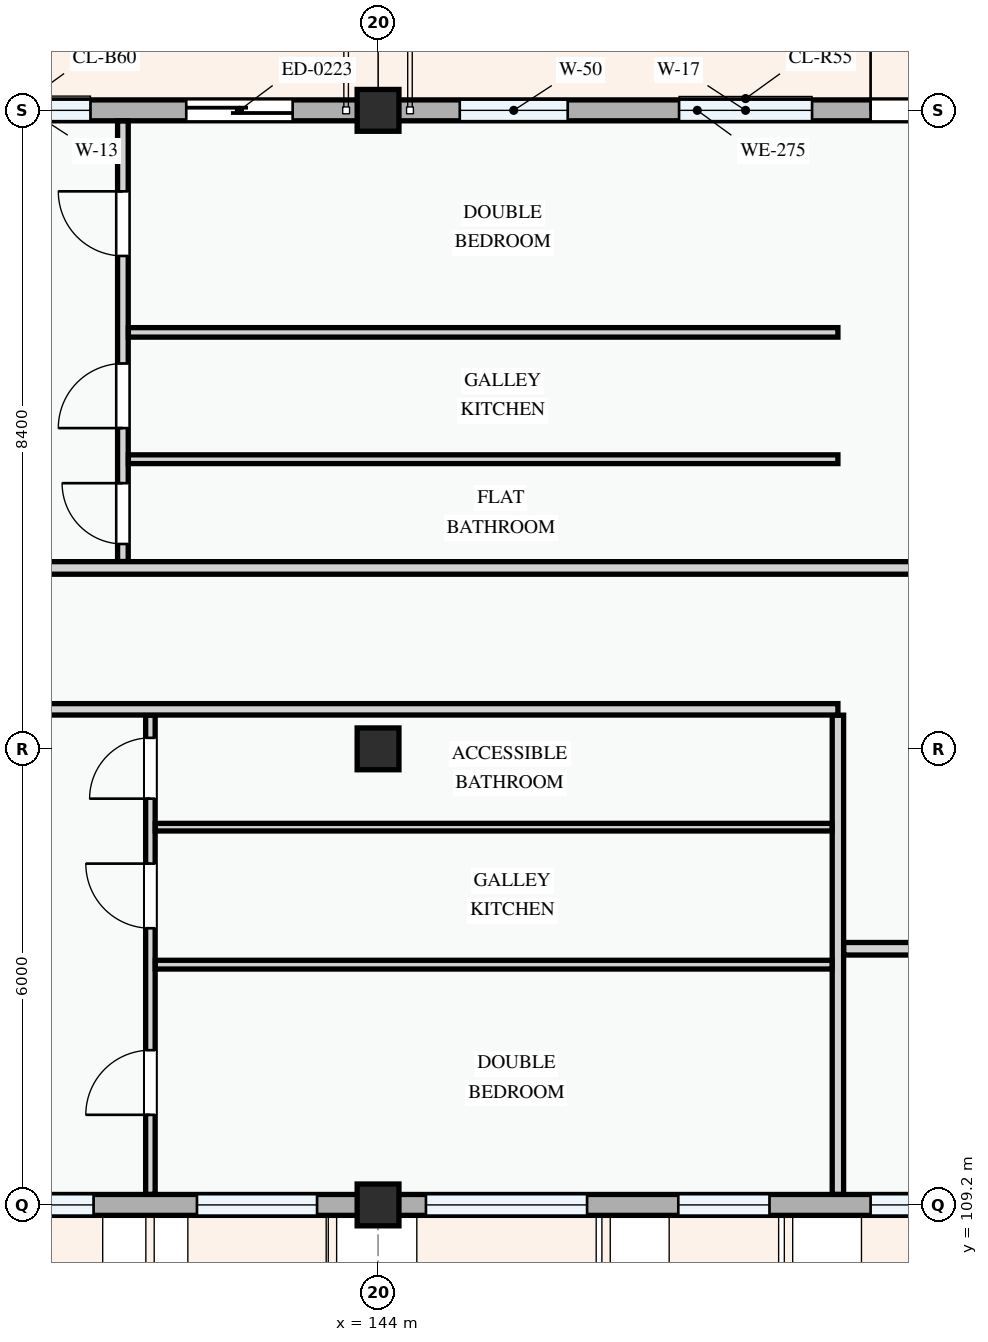
"""IFC4 building model, lengths in metres.
Left out: names, types, materials, properties, quantities, classifications, styles, units other than length and angle.
Written with IfcOpenShell. Run it as: python <this file> out.ifc"""

import sys

from ifc_helpers import new_model, si_unit, direction, frame, frame_2d, origin, origin_2d, place, context, subcontext, project, spatial, rectangle, extrude, element, fill, save


model = new_model("IFC4")
c1 = context("Model", 3, precision=1e-05, world=origin(), true_north=direction((0.0, 1.0)))
c2 = subcontext(c1, "Body", "Model", "MODEL_VIEW")
j1 = project(units=[si_unit("LENGTHUNIT", "METRE"), si_unit("PLANEANGLEUNIT", "RADIAN")], contexts=[c1])
p1 = place(None, origin())
s1 = spatial("IfcSite", under=j1, at=p1, CompositionType="ELEMENT")
p2 = place(p1, origin())
s2 = spatial("IfcBuilding", under=s1, at=p2, CompositionType="ELEMENT")
p3 = place(p2, frame((0.0, 0.0, 27.9)))
s3 = spatial("IfcBuildingStorey", under=s2, at=p3, CompositionType="ELEMENT", Elevation=27.9)
for number, where, z_axis, x_axis in (
    (1, (144.0, 109.2, 0.0), (0.0, 0.0, 1.0), (1.0, 0.0, 0.0)),
    (2, (144.0, 115.2, 0.0), (0.0, 0.0, 1.0), (1.0, 0.0, 0.0)),
    (3, (144.0, 123.6, 0.0), (0.0, 0.0, 1.0), (1.0, 0.0, 0.0)),
):
    element("IfcColumn", number, at=place(p3, frame(where, z_axis=z_axis, x_axis=x_axis)), inside=s3, PredefinedType="COLUMN", context=c2, shape_type="SweptSolid", body=[
        extrude(rectangle(XDim=0.55, YDim=0.55, at=origin_2d()), origin(), (0.0, 0.0, 1.0), 3.3),
    ])
p4 = place(p3, frame((152.4, 123.6, 0.0), z_axis=(0.0, 0.0, 1.0), x_axis=(-1.0, 0.0, 0.0)))
e4 = element("IfcWall", 4, at=p4, inside=s3, PredefinedType="STANDARD", context=c2, shape_type="SweptSolid", body=[
    extrude(rectangle(XDim=8.4, YDim=0.275, at=frame_2d((4.2, 0.0))), origin(), (0.0, 0.0, 1.0), 2.345),
])
p5 = place(p4, frame((0.62, 0.0, 0.0)))
e5 = element("IfcOpeningElement", 5, at=p5, cuts=e4, PredefinedType="OPENING", context=c2, shape_type="SweptSolid", body=[
    extrude(rectangle(XDim=1.3, YDim=2.15, at=frame_2d((0.65, 1.075))), frame((0.0, 0.147, 0.0), z_axis=(0.0, -1.0, 0.0), x_axis=(1.0, 0.0, 0.0)), (0.0, 0.0, 1.0), 0.295),
])
p6 = place(p4, frame((2.69, 0.0, 0.78)))
e6 = element("IfcOpeningElement", 6, at=p6, cuts=e4, PredefinedType="OPENING", context=c2, shape_type="SweptSolid", body=[
    extrude(rectangle(XDim=1.75, YDim=1.45, at=frame_2d((0.875, 0.725))), frame((0.0, 0.147, 0.0), z_axis=(0.0, -1.0, 0.0), x_axis=(1.0, 0.0, 0.0)), (0.0, 0.0, 1.0), 0.295),
])
p7 = place(p4, frame((5.905, 0.0, 0.78)))
e7 = element("IfcOpeningElement", 7, at=p7, cuts=e4, PredefinedType="OPENING", context=c2, shape_type="SweptSolid", body=[
    extrude(rectangle(XDim=1.42, YDim=1.38, at=frame_2d((0.71, 0.69))), frame((0.0, 0.147, 0.0), z_axis=(0.0, -1.0, 0.0), x_axis=(1.0, 0.0, 0.0)), (0.0, 0.0, 1.0), 0.295),
])
p8 = place(p3, frame((144.0, 123.6, 0.0), z_axis=(0.0, 0.0, 1.0), x_axis=(-1.0, 0.0, 0.0)))
e8 = element("IfcWall", 8, at=p8, inside=s3, PredefinedType="STANDARD", context=c2, shape_type="SweptSolid", body=[
    extrude(rectangle(XDim=6.0, YDim=0.275, at=frame_2d((3.0, 0.0))), origin(), (0.0, 0.0, 1.0), 2.445),
])
p9 = place(p8, frame((1.123, 0.0, 0.0)))
e9 = element("IfcOpeningElement", 9, at=p9, cuts=e8, PredefinedType="OPENING", context=c2, shape_type="SweptSolid", body=[
    extrude(rectangle(XDim=1.4, YDim=2.2, at=frame_2d((0.7, 1.1))), frame((0.0, 0.147, 0.0), z_axis=(0.0, -1.0, 0.0), x_axis=(1.0, 0.0, 0.0)), (0.0, 0.0, 1.0), 0.295),
])
p10 = place(p8, frame((3.783, 0.0, 0.78)))
e10 = element("IfcOpeningElement", 10, at=p10, cuts=e8, PredefinedType="OPENING", context=c2, shape_type="SweptSolid", body=[
    extrude(rectangle(XDim=1.6, YDim=1.55, at=frame_2d((0.8, 0.775))), frame((0.0, 0.147, 0.0), z_axis=(0.0, -1.0, 0.0), x_axis=(1.0, 0.0, 0.0)), (0.0, 0.0, 1.0), 0.295),
])
p11 = place(p3, frame((138.0, 109.2, 0.0), z_axis=(0.0, 0.0, 1.0), x_axis=(1.0, 0.0, 0.0)))
e11 = element("IfcWall", 11, at=p11, inside=s3, PredefinedType="STANDARD", context=c2, shape_type="SweptSolid", body=[
    extrude(rectangle(XDim=6.0, YDim=0.275, at=frame_2d((3.0, 0.0))), origin(), (0.0, 0.0, 1.0), 2.475),
])
p12 = place(p11, frame((0.938, 0.0, 0.78)))
e12 = element("IfcOpeningElement", 12, at=p12, cuts=e11, PredefinedType="OPENING", context=c2, shape_type="SweptSolid", body=[
    extrude(rectangle(XDim=1.32, YDim=1.35, at=frame_2d((0.66, 0.675))), frame((0.0, 0.147, 0.0), z_axis=(0.0, -1.0, 0.0), x_axis=(1.0, 0.0, 0.0)), (0.0, 0.0, 1.0), 0.295),
])
p13 = place(p11, frame((3.617, 0.0, 0.78)))
e13 = element("IfcOpeningElement", 13, at=p13, cuts=e11, PredefinedType="OPENING", context=c2, shape_type="SweptSolid", body=[
    extrude(rectangle(XDim=1.58, YDim=1.48, at=frame_2d((0.79, 0.74))), frame((0.0, 0.147, 0.0), z_axis=(0.0, -1.0, 0.0), x_axis=(1.0, 0.0, 0.0)), (0.0, 0.0, 1.0), 0.295),
])
p14 = place(p3, frame((144.0, 109.2, 0.0), z_axis=(0.0, 0.0, 1.0), x_axis=(1.0, 0.0, 0.0)))
e14 = element("IfcWall", 14, at=p14, inside=s3, PredefinedType="STANDARD", context=c2, shape_type="SweptSolid", body=[
    extrude(rectangle(XDim=8.4, YDim=0.275, at=frame_2d((4.2, 0.0))), origin(), (0.0, 0.0, 1.0), 2.375),
])
p15 = place(p14, frame((0.63, 0.0, 0.78)))
e15 = element("IfcOpeningElement", 15, at=p15, cuts=e14, PredefinedType="OPENING", context=c2, shape_type="SweptSolid", body=[
    extrude(rectangle(XDim=2.12, YDim=1.44, at=frame_2d((1.06, 0.72))), frame((0.0, 0.147, 0.0), z_axis=(0.0, -1.0, 0.0), x_axis=(1.0, 0.0, 0.0)), (0.0, 0.0, 1.0), 0.295),
])
p16 = place(p14, frame((3.95, 0.0, 0.78)))
e16 = element("IfcOpeningElement", 16, at=p16, cuts=e14, PredefinedType="OPENING", context=c2, shape_type="SweptSolid", body=[
    extrude(rectangle(XDim=1.2, YDim=1.35, at=frame_2d((0.6, 0.675))), frame((0.0, 0.147, 0.0), z_axis=(0.0, -1.0, 0.0), x_axis=(1.0, 0.0, 0.0)), (0.0, 0.0, 1.0), 0.295),
])
p17 = place(p14, frame((6.48, 0.0, 0.78)))
e17 = element("IfcOpeningElement", 17, at=p17, cuts=e14, PredefinedType="OPENING", context=c2, shape_type="SweptSolid", body=[
    extrude(rectangle(XDim=1.3, YDim=1.4, at=frame_2d((0.65, 0.7))), frame((0.0, 0.147, 0.0), z_axis=(0.0, -1.0, 0.0), x_axis=(1.0, 0.0, 0.0)), (0.0, 0.0, 1.0), 0.295),
])
p18 = place(p3, frame((150.05, 109.34, 0.0), z_axis=(0.0, 0.0, 1.0), x_axis=(0.0, 1.0, 0.0)))
e18 = element("IfcWall", 18, at=p18, inside=s3, PredefinedType="PARTITIONING", context=c2, shape_type="SweptSolid", body=[
    extrude(rectangle(XDim=6.303, YDim=0.15, at=frame_2d((3.152, 0.0))), origin(), (0.0, 0.0, 1.0), 3.0),
])
p19 = place(p3, frame((150.127, 112.57, 0.0), z_axis=(0.0, 0.0, 1.0), x_axis=(1.0, 0.0, 0.0)))
e19 = element("IfcWall", 19, at=p19, inside=s3, PredefinedType="PARTITIONING", context=c2, shape_type="SweptSolid", body=[
    extrude(rectangle(XDim=2.413, YDim=0.165, at=frame_2d((1.207, 0.0))), origin(), (0.0, 0.0, 1.0), 3.0),
])
p20 = place(p3, frame((141.005, 109.34, 0.0), z_axis=(0.0, 0.0, 1.0), x_axis=(0.0, 1.0, 0.0)))
e20 = element("IfcWall", 20, at=p20, inside=s3, PredefinedType="PARTITIONING", context=c2, shape_type="SweptSolid", body=[
    extrude(rectangle(XDim=6.303, YDim=0.125, at=frame_2d((3.152, 0.0))), origin(), (0.0, 0.0, 1.0), 3.0),
])
p21 = place(p20, frame((1.046, 0.0, 0.0)))
e21 = element("IfcOpeningElement", 21, at=p21, cuts=e20, PredefinedType="OPENING", context=c2, shape_type="SweptSolid", body=[
    extrude(rectangle(XDim=0.85, YDim=2.1, at=frame_2d((0.425, 1.05))), frame((0.0, 0.073, 0.0), z_axis=(0.0, -1.0, 0.0), x_axis=(1.0, 0.0, 0.0)), (0.0, 0.0, 1.0), 0.145),
])
p22 = place(p20, frame((3.501, 0.0, 0.0)))
e22 = element("IfcOpeningElement", 22, at=p22, cuts=e20, PredefinedType="OPENING", context=c2, shape_type="SweptSolid", body=[
    extrude(rectangle(XDim=0.85, YDim=2.1, at=frame_2d((0.425, 1.05))), frame((0.0, 0.073, 0.0), z_axis=(0.0, -1.0, 0.0), x_axis=(1.0, 0.0, 0.0)), (0.0, 0.0, 1.0), 0.145),
])
p23 = place(p20, frame((5.205, 0.0, 0.0)))
e23 = element("IfcOpeningElement", 23, at=p23, cuts=e20, PredefinedType="OPENING", context=c2, shape_type="SweptSolid", body=[
    extrude(rectangle(XDim=0.8, YDim=2.1, at=frame_2d((0.4, 1.05))), frame((0.0, 0.073, 0.0), z_axis=(0.0, -1.0, 0.0), x_axis=(1.0, 0.0, 0.0)), (0.0, 0.0, 1.0), 0.145),
])
p24 = place(p3, frame((141.07, 112.361, 0.0), z_axis=(0.0, 0.0, 1.0), x_axis=(1.0, 0.0, 0.0)))
e24 = element("IfcWall", 24, at=p24, inside=s3, PredefinedType="PARTITIONING", context=c2, shape_type="SweptSolid", body=[
    extrude(rectangle(XDim=8.903, YDim=0.115, at=frame_2d((4.452, 0.0))), origin(), (0.0, 0.0, 1.0), 3.0),
])
p25 = place(p3, frame((141.07, 114.17, 0.0), z_axis=(0.0, 0.0, 1.0), x_axis=(1.0, 0.0, 0.0)))
e25 = element("IfcWall", 25, at=p25, inside=s3, PredefinedType="PARTITIONING", context=c2, shape_type="SweptSolid", body=[
    extrude(rectangle(XDim=8.903, YDim=0.1, at=frame_2d((4.452, 0.0))), origin(), (0.0, 0.0, 1.0), 3.0),
])
p26 = place(p3, frame((140.643, 117.665, 0.0), z_axis=(0.0, 0.0, 1.0), x_axis=(0.0, 1.0, 0.0)))
e26 = element("IfcWall", 26, at=p26, inside=s3, PredefinedType="PARTITIONING", context=c2, shape_type="SweptSolid", body=[
    extrude(rectangle(XDim=5.796, YDim=0.14, at=frame_2d((2.898, 0.0))), origin(), (0.0, 0.0, 1.0), 3.0),
])
p27 = place(p26, frame((0.231, 0.0, 0.0)))
e27 = element("IfcOpeningElement", 27, at=p27, cuts=e26, PredefinedType="OPENING", context=c2, shape_type="SweptSolid", body=[
    extrude(rectangle(XDim=0.8, YDim=2.1, at=frame_2d((0.4, 1.05))), frame((0.0, 0.08, 0.0), z_axis=(0.0, -1.0, 0.0), x_axis=(1.0, 0.0, 0.0)), (0.0, 0.0, 1.0), 0.16),
])
p28 = place(p26, frame((1.755, 0.0, 0.0)))
e28 = element("IfcOpeningElement", 28, at=p28, cuts=e26, PredefinedType="OPENING", context=c2, shape_type="SweptSolid", body=[
    extrude(rectangle(XDim=0.85, YDim=2.1, at=frame_2d((0.425, 1.05))), frame((0.0, 0.08, 0.0), z_axis=(0.0, -1.0, 0.0), x_axis=(1.0, 0.0, 0.0)), (0.0, 0.0, 1.0), 0.16),
])
p29 = place(p26, frame((4.02, 0.0, 0.0)))
e29 = element("IfcOpeningElement", 29, at=p29, cuts=e26, PredefinedType="OPENING", context=c2, shape_type="SweptSolid", body=[
    extrude(rectangle(XDim=0.85, YDim=2.1, at=frame_2d((0.425, 1.05))), frame((0.0, 0.08, 0.0), z_axis=(0.0, -1.0, 0.0), x_axis=(1.0, 0.0, 0.0)), (0.0, 0.0, 1.0), 0.16),
])
p30 = place(p3, frame((140.715, 120.679, 0.0), z_axis=(0.0, 0.0, 1.0), x_axis=(1.0, 0.0, 0.0)))
e30 = element("IfcWall", 30, at=p30, inside=s3, PredefinedType="PARTITIONING", context=c2, shape_type="SweptSolid", body=[
    extrude(rectangle(XDim=9.335, YDim=0.125, at=frame_2d((4.667, 0.0))), origin(), (0.0, 0.0, 1.0), 3.0),
])
p31 = place(p3, frame((140.715, 119.01, 0.0), z_axis=(0.0, 0.0, 1.0), x_axis=(1.0, 0.0, 0.0)))
e31 = element("IfcWall", 31, at=p31, inside=s3, PredefinedType="PARTITIONING", context=c2, shape_type="SweptSolid", body=[
    extrude(rectangle(XDim=9.335, YDim=0.115, at=frame_2d((4.667, 0.0))), origin(), (0.0, 0.0, 1.0), 3.0),
])
p32 = place(p3, frame((80.54, 115.72, 0.0), z_axis=(0.0, 0.0, 1.0), x_axis=(1.0, 0.0, 0.0)))
e32 = element("IfcWall", 32, at=p32, inside=s3, PredefinedType="PARTITIONING", context=c2, shape_type="SweptSolid", body=[
    extrude(rectangle(XDim=69.51, YDim=0.15, at=frame_2d((34.755, 0.0))), origin(), (0.0, 0.0, 1.0), 3.0),
])
p33 = place(p32, frame((9.587, 0.0, 0.0)))
e33 = element("IfcOpeningElement", 33, at=p33, cuts=e32, PredefinedType="OPENING", context=c2, shape_type="SweptSolid", body=[
    extrude(rectangle(XDim=0.92, YDim=2.1, at=frame_2d((0.46, 1.05))), frame((0.0, 0.085, 0.0), z_axis=(0.0, -1.0, 0.0), x_axis=(1.0, 0.0, 0.0)), (0.0, 0.0, 1.0), 0.17),
])
p34 = place(p32, frame((37.68, 0.0, 0.0)))
e34 = element("IfcOpeningElement", 34, at=p34, cuts=e32, PredefinedType="OPENING", context=c2, shape_type="SweptSolid", body=[
    extrude(rectangle(XDim=0.92, YDim=2.1, at=frame_2d((0.46, 1.05))), frame((0.0, 0.085, 0.0), z_axis=(0.0, -1.0, 0.0), x_axis=(1.0, 0.0, 0.0)), (0.0, 0.0, 1.0), 0.17),
])
p35 = place(p32, frame((52.856, 0.0, 0.0)))
e35 = element("IfcOpeningElement", 35, at=p35, cuts=e32, PredefinedType="OPENING", context=c2, shape_type="SweptSolid", body=[
    extrude(rectangle(XDim=0.92, YDim=2.1, at=frame_2d((0.46, 1.05))), frame((0.0, 0.085, 0.0), z_axis=(0.0, -1.0, 0.0), x_axis=(1.0, 0.0, 0.0)), (0.0, 0.0, 1.0), 0.17),
])
p36 = place(p3, frame((80.54, 117.58, 0.0), z_axis=(0.0, 0.0, 1.0), x_axis=(1.0, 0.0, 0.0)))
e36 = element("IfcWall", 36, at=p36, inside=s3, PredefinedType="PARTITIONING", context=c2, shape_type="SweptSolid", body=[
    extrude(rectangle(XDim=72.0, YDim=0.165, at=frame_2d((36.0, 0.0))), origin(), (0.0, 0.0, 1.0), 3.0),
])
p37 = place(p36, frame((9.562, 0.0, 0.0)))
e37 = element("IfcOpeningElement", 37, at=p37, cuts=e36, PredefinedType="OPENING", context=c2, shape_type="SweptSolid", body=[
    extrude(rectangle(XDim=0.96, YDim=2.12, at=frame_2d((0.48, 1.06))), frame((0.0, 0.093, 0.0), z_axis=(0.0, -1.0, 0.0), x_axis=(1.0, 0.0, 0.0)), (0.0, 0.0, 1.0), 0.185),
])
p38 = place(p36, frame((37.179, 0.0, 0.0)))
e38 = element("IfcOpeningElement", 38, at=p38, cuts=e36, PredefinedType="OPENING", context=c2, shape_type="SweptSolid", body=[
    extrude(rectangle(XDim=0.92, YDim=2.1, at=frame_2d((0.46, 1.05))), frame((0.0, 0.093, 0.0), z_axis=(0.0, -1.0, 0.0), x_axis=(1.0, 0.0, 0.0)), (0.0, 0.0, 1.0), 0.185),
])
p39 = place(p36, frame((52.799, 0.0, 0.0)))
e39 = element("IfcOpeningElement", 39, at=p39, cuts=e36, PredefinedType="OPENING", context=c2, shape_type="SweptSolid", body=[
    extrude(rectangle(XDim=0.92, YDim=2.1, at=frame_2d((0.46, 1.05))), frame((0.0, 0.093, 0.0), z_axis=(0.0, -1.0, 0.0), x_axis=(1.0, 0.0, 0.0)), (0.0, 0.0, 1.0), 0.185),
])
p40 = place(p5, frame((1.3, 0.0, 0.0), z_axis=(0.0, 0.0, 1.0), x_axis=(-1.0, 0.0, 0.0)))
e40 = element("IfcDoor", 40, at=p40, inside=s3, OperationType="SINGLE_SWING_LEFT", PredefinedType="DOOR", context=c2, shape_type="SweptSolid", body=[
    extrude(rectangle(XDim=1.3, YDim=2.15, at=frame_2d((0.65, 1.075))), frame((0.0, 0.025, 0.0), z_axis=(0.0, -1.0, 0.0), x_axis=(1.0, 0.0, 0.0)), (0.0, 0.0, 1.0), 0.05),
])
fill(e5, e40)
p41 = place(p6, origin())
e41 = element("IfcWindow", 41, at=p41, inside=s3, PartitioningType="DOUBLE_PANEL_VERTICAL", PredefinedType="WINDOW", context=c2, shape_type="SweptSolid", body=[
    extrude(rectangle(XDim=1.75, YDim=1.45, at=frame_2d((0.875, 0.725))), frame((0.0, 0.03, 0.0), z_axis=(0.0, -1.0, 0.0), x_axis=(1.0, 0.0, 0.0)), (0.0, 0.0, 1.0), 0.06),
])
fill(e6, e41)
p42 = place(p7, origin())
e42 = element("IfcWindow", 42, at=p42, inside=s3, PartitioningType="SINGLE_PANEL", PredefinedType="WINDOW", context=c2, shape_type="SweptSolid", body=[
    extrude(rectangle(XDim=1.42, YDim=1.38, at=frame_2d((0.71, 0.69))), frame((0.0, 0.03, 0.0), z_axis=(0.0, -1.0, 0.0), x_axis=(1.0, 0.0, 0.0)), (0.0, 0.0, 1.0), 0.06),
])
fill(e7, e42)
p43 = place(p9, frame((1.4, 0.0, 0.0), z_axis=(0.0, 0.0, 1.0), x_axis=(-1.0, 0.0, 0.0)))
e43 = element("IfcDoor", 43, at=p43, inside=s3, OperationType="SLIDING_TO_LEFT", PredefinedType="DOOR", context=c2, shape_type="SweptSolid", body=[
    extrude(rectangle(XDim=1.4, YDim=2.2, at=frame_2d((0.7, 1.1))), frame((0.0, 0.025, 0.0), z_axis=(0.0, -1.0, 0.0), x_axis=(1.0, 0.0, 0.0)), (0.0, 0.0, 1.0), 0.05),
])
fill(e9, e43)
p44 = place(p10, origin())
e44 = element("IfcWindow", 44, at=p44, inside=s3, PartitioningType="DOUBLE_PANEL_VERTICAL", PredefinedType="WINDOW", context=c2, shape_type="SweptSolid", body=[
    extrude(rectangle(XDim=1.6, YDim=1.55, at=frame_2d((0.8, 0.775))), frame((0.0, 0.03, 0.0), z_axis=(0.0, -1.0, 0.0), x_axis=(1.0, 0.0, 0.0)), (0.0, 0.0, 1.0), 0.06),
])
fill(e10, e44)
p45 = place(p12, origin())
e45 = element("IfcWindow", 45, at=p45, inside=s3, PartitioningType="SINGLE_PANEL", PredefinedType="WINDOW", context=c2, shape_type="SweptSolid", body=[
    extrude(rectangle(XDim=1.32, YDim=1.35, at=frame_2d((0.66, 0.675))), frame((0.0, 0.03, 0.0), z_axis=(0.0, -1.0, 0.0), x_axis=(1.0, 0.0, 0.0)), (0.0, 0.0, 1.0), 0.06),
])
fill(e12, e45)
p46 = place(p13, origin())
e46 = element("IfcWindow", 46, at=p46, inside=s3, PartitioningType="SINGLE_PANEL", PredefinedType="WINDOW", context=c2, shape_type="SweptSolid", body=[
    extrude(rectangle(XDim=1.58, YDim=1.48, at=frame_2d((0.79, 0.74))), frame((0.0, 0.03, 0.0), z_axis=(0.0, -1.0, 0.0), x_axis=(1.0, 0.0, 0.0)), (0.0, 0.0, 1.0), 0.06),
])
fill(e13, e46)
p47 = place(p15, origin())
e47 = element("IfcWindow", 47, at=p47, inside=s3, PartitioningType="DOUBLE_PANEL_VERTICAL", PredefinedType="WINDOW", context=c2, shape_type="SweptSolid", body=[
    extrude(rectangle(XDim=2.12, YDim=1.44, at=frame_2d((1.06, 0.72))), frame((0.0, 0.03, 0.0), z_axis=(0.0, -1.0, 0.0), x_axis=(1.0, 0.0, 0.0)), (0.0, 0.0, 1.0), 0.06),
])
fill(e15, e47)
p48 = place(p16, origin())
e48 = element("IfcWindow", 48, at=p48, inside=s3, PartitioningType="SINGLE_PANEL", PredefinedType="WINDOW", context=c2, shape_type="SweptSolid", body=[
    extrude(rectangle(XDim=1.2, YDim=1.35, at=frame_2d((0.6, 0.675))), frame((0.0, 0.03, 0.0), z_axis=(0.0, -1.0, 0.0), x_axis=(1.0, 0.0, 0.0)), (0.0, 0.0, 1.0), 0.06),
])
fill(e16, e48)
p49 = place(p17, origin())
e49 = element("IfcWindow", 49, at=p49, inside=s3, PartitioningType="SINGLE_PANEL", PredefinedType="WINDOW", context=c2, shape_type="SweptSolid", body=[
    extrude(rectangle(XDim=1.3, YDim=1.4, at=frame_2d((0.65, 0.7))), frame((0.0, 0.03, 0.0), z_axis=(0.0, -1.0, 0.0), x_axis=(1.0, 0.0, 0.0)), (0.0, 0.0, 1.0), 0.06),
])
fill(e17, e49)
p50 = place(p21, origin())
e50 = element("IfcDoor", 50, at=p50, inside=s3, OperationType="SINGLE_SWING_LEFT", PredefinedType="DOOR", context=c2, shape_type="SweptSolid", body=[
    extrude(rectangle(XDim=0.85, YDim=2.1, at=frame_2d((0.425, 1.05))), frame((0.0, 0.025, 0.0), z_axis=(0.0, -1.0, 0.0), x_axis=(1.0, 0.0, 0.0)), (0.0, 0.0, 1.0), 0.05),
])
fill(e21, e50)
p51 = place(p22, origin())
e51 = element("IfcDoor", 51, at=p51, inside=s3, OperationType="SINGLE_SWING_RIGHT", PredefinedType="DOOR", context=c2, shape_type="SweptSolid", body=[
    extrude(rectangle(XDim=0.85, YDim=2.1, at=frame_2d((0.425, 1.05))), frame((0.0, 0.025, 0.0), z_axis=(0.0, -1.0, 0.0), x_axis=(1.0, 0.0, 0.0)), (0.0, 0.0, 1.0), 0.05),
])
fill(e22, e51)
p52 = place(p23, origin())
e52 = element("IfcDoor", 52, at=p52, inside=s3, OperationType="SINGLE_SWING_LEFT", PredefinedType="DOOR", context=c2, shape_type="SweptSolid", body=[
    extrude(rectangle(XDim=0.8, YDim=2.1, at=frame_2d((0.4, 1.05))), frame((0.0, 0.025, 0.0), z_axis=(0.0, -1.0, 0.0), x_axis=(1.0, 0.0, 0.0)), (0.0, 0.0, 1.0), 0.05),
])
fill(e23, e52)
p53 = place(p27, origin())
e53 = element("IfcDoor", 53, at=p53, inside=s3, OperationType="SINGLE_SWING_RIGHT", PredefinedType="DOOR", context=c2, shape_type="SweptSolid", body=[
    extrude(rectangle(XDim=0.8, YDim=2.1, at=frame_2d((0.4, 1.05))), frame((0.0, 0.025, 0.0), z_axis=(0.0, -1.0, 0.0), x_axis=(1.0, 0.0, 0.0)), (0.0, 0.0, 1.0), 0.05),
])
fill(e27, e53)
p54 = place(p28, origin())
e54 = element("IfcDoor", 54, at=p54, inside=s3, OperationType="SINGLE_SWING_LEFT", PredefinedType="DOOR", context=c2, shape_type="SweptSolid", body=[
    extrude(rectangle(XDim=0.85, YDim=2.1, at=frame_2d((0.425, 1.05))), frame((0.0, 0.025, 0.0), z_axis=(0.0, -1.0, 0.0), x_axis=(1.0, 0.0, 0.0)), (0.0, 0.0, 1.0), 0.05),
])
fill(e28, e54)
p55 = place(p29, origin())
e55 = element("IfcDoor", 55, at=p55, inside=s3, OperationType="SINGLE_SWING_RIGHT", PredefinedType="DOOR", context=c2, shape_type="SweptSolid", body=[
    extrude(rectangle(XDim=0.85, YDim=2.1, at=frame_2d((0.425, 1.05))), frame((0.0, 0.025, 0.0), z_axis=(0.0, -1.0, 0.0), x_axis=(1.0, 0.0, 0.0)), (0.0, 0.0, 1.0), 0.05),
])
fill(e29, e55)
save(model, sys.argv[1])
